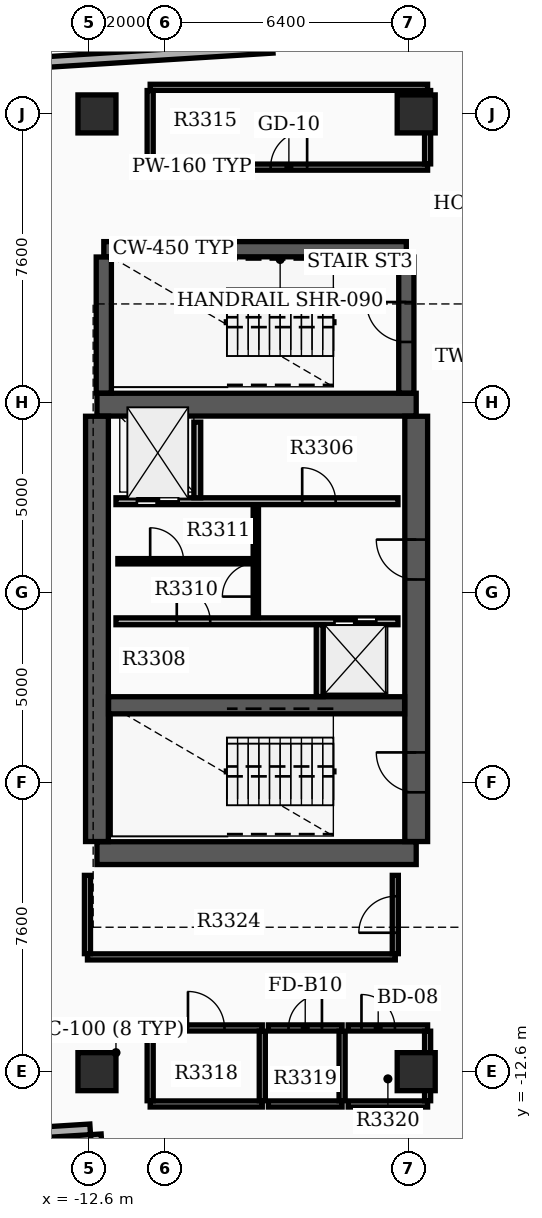
"""IFC4 building model, lengths in metres.
Left out: names, types, materials, properties, quantities, classifications, styles, units other than length and angle.
Written with IfcOpenShell. Run it as: python <this file> out.ifc"""

import sys

from ifc_helpers import new_model, si_unit, direction, frame, frame_2d, origin, origin_2d, place, context, subcontext, project, spatial, rectangle, extrude, element, fill, save


model = new_model("IFC4")
c1 = context("Model", 3, precision=1e-05, world=origin(), true_north=direction((0.0, 1.0)))
c2 = subcontext(c1, "Body", "Model", "MODEL_VIEW")
j1 = project(units=[si_unit("LENGTHUNIT", "METRE"), si_unit("PLANEANGLEUNIT", "RADIAN")], contexts=[c1])
p1 = place(None, origin())
s1 = spatial("IfcSite", under=j1, at=p1, CompositionType="ELEMENT")
p2 = place(p1, origin())
s2 = spatial("IfcBuilding", under=s1, at=p2, CompositionType="ELEMENT")
p3 = place(p2, frame((0.0, 0.0, 209.1)))
s3 = spatial("IfcBuildingStorey", under=s2, at=p3, CompositionType="ELEMENT", Elevation=209.1)
for number, where, z_axis, x_axis in (
    (1, (-12.4, -6.85, 0.0), (0.0, 0.0, 1.0), (1.0, 0.0, 0.0)),
    (2, (-12.4, 4.95, 0.0), (0.0, 0.0, 1.0), (1.0, 0.0, 0.0)),
):
    element("IfcWall", number, at=place(p3, frame(where, z_axis=z_axis, x_axis=x_axis)), inside=s3, PredefinedType="SHEAR", context=c2, shape_type="SweptSolid", body=[
        extrude(rectangle(XDim=8.4, YDim=0.6, at=frame_2d((4.2, 0.0))), origin(), (0.0, 0.0, 1.0), 3.7),
    ])
p4 = place(p3, frame((-12.4, -6.545, 0.0), z_axis=(0.0, 0.0, 1.0), x_axis=(0.0, 1.0, 0.0)))
e3 = element("IfcWall", 3, at=p4, inside=s3, PredefinedType="SHEAR", context=c2, shape_type="SweptSolid", body=[
    extrude(rectangle(XDim=11.19, YDim=0.6, at=frame_2d((5.595, 0.0))), origin(), (0.0, 0.0, 1.0), 3.7),
])
p5 = place(p3, frame((-4.0, -6.545, 0.0), z_axis=(0.0, 0.0, 1.0), x_axis=(0.0, 1.0, 0.0)))
e4 = element("IfcWall", 4, at=p5, inside=s3, PredefinedType="SHEAR", context=c2, shape_type="SweptSolid", body=[
    extrude(rectangle(XDim=11.19, YDim=0.6, at=frame_2d((5.595, 0.0))), origin(), (0.0, 0.0, 1.0), 3.7),
])
p6 = place(p5, frame((1.295, 0.0, 0.0)))
e5 = element("IfcOpeningElement", 5, at=p6, cuts=e4, PredefinedType="OPENING", context=c2, shape_type="SweptSolid", body=[
    extrude(rectangle(XDim=1.05, YDim=2.15, at=frame_2d((0.525, 1.075))), frame((0.0, 0.31, 0.0), z_axis=(0.0, -1.0, 0.0), x_axis=(1.0, 0.0, 0.0)), (0.0, 0.0, 1.0), 0.62),
])
p7 = place(p5, frame((6.895, 0.0, 0.0)))
e6 = element("IfcOpeningElement", 6, at=p7, cuts=e4, PredefinedType="OPENING", context=c2, shape_type="SweptSolid", body=[
    extrude(rectangle(XDim=1.05, YDim=2.15, at=frame_2d((0.525, 1.075))), frame((0.0, 0.31, 0.0), z_axis=(0.0, -1.0, 0.0), x_axis=(1.0, 0.0, 0.0)), (0.0, 0.0, 1.0), 0.62),
])
p8 = place(p3, frame((-12.095, -2.96, 0.0), z_axis=(0.0, 0.0, 1.0), x_axis=(1.0, 0.0, 0.0)))
e7 = element("IfcWall", 7, at=p8, inside=s3, PredefinedType="SHEAR", context=c2, shape_type="SweptSolid", body=[
    extrude(rectangle(XDim=7.79, YDim=0.45, at=frame_2d((3.895, 0.0))), origin(), (0.0, 0.0, 1.0), 3.7),
])
p9 = place(p3, frame((-12.22, 9.04, 0.0), z_axis=(0.0, 0.0, 1.0), x_axis=(1.0, 0.0, 0.0)))
e8 = element("IfcWall", 8, at=p9, inside=s3, PredefinedType="SHEAR", context=c2, shape_type="SweptSolid", body=[
    extrude(rectangle(XDim=7.96, YDim=0.4, at=frame_2d((3.98, 0.0))), origin(), (0.0, 0.0, 1.0), 3.7),
])
p10 = place(p3, frame((-12.22, 5.255, 0.0), z_axis=(0.0, 0.0, 1.0), x_axis=(0.0, 1.0, 0.0)))
e9 = element("IfcWall", 9, at=p10, inside=s3, PredefinedType="SHEAR", context=c2, shape_type="SweptSolid", body=[
    extrude(rectangle(XDim=3.58, YDim=0.4, at=frame_2d((1.79, 0.0))), origin(), (0.0, 0.0, 1.0), 3.7),
])
p11 = place(p3, frame((-4.26, 5.255, 0.0), z_axis=(0.0, 0.0, 1.0), x_axis=(0.0, 1.0, 0.0)))
e10 = element("IfcWall", 10, at=p11, inside=s3, PredefinedType="SHEAR", context=c2, shape_type="SweptSolid", body=[
    extrude(rectangle(XDim=3.58, YDim=0.4, at=frame_2d((1.79, 0.0))), origin(), (0.0, 0.0, 1.0), 3.7),
])
p12 = place(p11, frame((1.345, 0.0, 0.0)))
e11 = element("IfcOpeningElement", 11, at=p12, cuts=e10, PredefinedType="OPENING", context=c2, shape_type="SweptSolid", body=[
    extrude(rectangle(XDim=1.05, YDim=2.15, at=frame_2d((0.525, 1.075))), frame((0.0, 0.21, 0.0), z_axis=(0.0, -1.0, 0.0), x_axis=(1.0, 0.0, 0.0)), (0.0, 0.0, 1.0), 0.42),
])
for number, where, z_axis, x_axis in (
    (12, (-12.4, -12.6, 0.0), (0.0, 0.0, 1.0), (1.0, 0.0, 0.0)),
    (13, (-12.4, 12.6, 0.0), (0.0, 0.0, 1.0), (1.0, 0.0, 0.0)),
    (14, (-4.0, -12.6, 0.0), (0.0, 0.0, 1.0), (1.0, 0.0, 0.0)),
    (15, (-4.0, 12.6, 0.0), (0.0, 0.0, 1.0), (1.0, 0.0, 0.0)),
):
    element("IfcColumn", number, at=place(p3, frame(where, z_axis=z_axis, x_axis=x_axis)), inside=s3, PredefinedType="COLUMN", context=c2, shape_type="SweptSolid", body=[
        extrude(rectangle(XDim=1.0, YDim=1.0, at=origin_2d()), origin(), (0.0, 0.0, 1.0), 3.9),
    ])
p13 = place(p3, frame((-14.063, 13.945, 0.0), z_axis=(0.0, 0.0, 1.0), x_axis=(0.998027314704, 0.062781200242, 0.0)))
e16 = element("IfcWall", 16, at=p13, inside=s3, PredefinedType="STANDARD", context=c2, shape_type="SweptSolid", body=[
    extrude(rectangle(XDim=6.3, YDim=0.28, at=frame_2d((3.15, 0.0))), origin(), (0.0, 0.0, 1.0), 3.18),
])
p14 = place(p3, frame((-13.796, -14.194, 0.0), z_axis=(0.0, 0.0, 1.0), x_axis=(0.998023660242, 0.06283926796, 0.0)))
e17 = element("IfcWall", 17, at=p14, inside=s3, PredefinedType="STANDARD", context=c2, shape_type="SweptSolid", body=[
    extrude(rectangle(XDim=1.22, YDim=0.28, at=frame_2d((0.61, 0.0))), origin(), (0.0, 0.0, 1.0), 3.18),
])
p15 = place(p3, frame((-12.43, -14.249, 0.0), z_axis=(0.0, 0.0, 1.0), x_axis=(0.062824119533, -0.998024613927, 0.0)))
e18 = element("IfcWall", 18, at=p15, inside=s3, PredefinedType="STANDARD", context=c2, shape_type="SweptSolid", body=[
    extrude(rectangle(XDim=1.5, YDim=0.28, at=frame_2d((0.75, 0.0))), origin(), (0.0, 0.0, 1.0), 3.18),
])
p16 = place(p3, frame((-11.9, 2.41, 0.0), z_axis=(0.0, 0.0, 1.0), x_axis=(1.0, 0.0, 0.0)))
e19 = element("IfcWall", 19, at=p16, inside=s3, PredefinedType="SOLIDWALL", context=c2, shape_type="SweptSolid", body=[
    extrude(rectangle(XDim=7.42, YDim=0.18, at=frame_2d((3.71, 0.0))), origin(), (0.0, 0.0, 1.0), 3.17),
])
p17 = place(p16, frame((0.55, 0.0, 0.0)))
e20 = element("IfcOpeningElement", 20, at=p17, cuts=e19, PredefinedType="OPENING", context=c2, shape_type="SweptSolid", body=[
    extrude(rectangle(XDim=1.1, YDim=2.15, at=frame_2d((0.55, 1.075))), frame((0.0, 0.1, 0.0), z_axis=(0.0, -1.0, 0.0), x_axis=(1.0, 0.0, 0.0)), (0.0, 0.0, 1.0), 0.2),
])
p18 = place(p16, frame((4.9, 0.0, 0.0)))
e21 = element("IfcOpeningElement", 21, at=p18, cuts=e19, PredefinedType="OPENING", context=c2, shape_type="SweptSolid", body=[
    extrude(rectangle(XDim=0.88, YDim=2.1, at=frame_2d((0.44, 1.05))), frame((0.0, 0.1, 0.0), z_axis=(0.0, -1.0, 0.0), x_axis=(1.0, 0.0, 0.0)), (0.0, 0.0, 1.0), 0.2),
])
p19 = place(p3, frame((-11.9, -0.75, 0.0), z_axis=(0.0, 0.0, 1.0), x_axis=(1.0, 0.0, 0.0)))
e22 = element("IfcWall", 22, at=p19, inside=s3, PredefinedType="SOLIDWALL", context=c2, shape_type="SweptSolid", body=[
    extrude(rectangle(XDim=7.42, YDim=0.18, at=frame_2d((3.71, 0.0))), origin(), (0.0, 0.0, 1.0), 3.17),
])
p20 = place(p19, frame((5.75, 0.0, 0.0)))
e23 = element("IfcOpeningElement", 23, at=p20, cuts=e22, PredefinedType="OPENING", context=c2, shape_type="SweptSolid", body=[
    extrude(rectangle(XDim=1.1, YDim=2.15, at=frame_2d((0.55, 1.075))), frame((0.0, 0.1, 0.0), z_axis=(0.0, -1.0, 0.0), x_axis=(1.0, 0.0, 0.0)), (0.0, 0.0, 1.0), 0.2),
])
p21 = place(p19, frame((1.6, 0.0, 0.0)))
e24 = element("IfcOpeningElement", 24, at=p21, cuts=e22, PredefinedType="OPENING", context=c2, shape_type="SweptSolid", body=[
    extrude(rectangle(XDim=0.88, YDim=2.1, at=frame_2d((0.44, 1.05))), frame((0.0, 0.1, 0.0), z_axis=(0.0, -1.0, 0.0), x_axis=(1.0, 0.0, 0.0)), (0.0, 0.0, 1.0), 0.2),
])
p22 = place(p3, frame((-9.76, 2.5, 0.0), z_axis=(0.0, 0.0, 1.0), x_axis=(0.0, 1.0, 0.0)))
e25 = element("IfcWall", 25, at=p22, inside=s3, PredefinedType="SOLIDWALL", context=c2, shape_type="SweptSolid", body=[
    extrude(rectangle(XDim=1.99, YDim=0.18, at=frame_2d((0.995, 0.0))), origin(), (0.0, 0.0, 1.0), 3.17),
])
p23 = place(p3, frame((-6.54, -2.73, 0.0), z_axis=(0.0, 0.0, 1.0), x_axis=(0.0, 1.0, 0.0)))
e26 = element("IfcWall", 26, at=p23, inside=s3, PredefinedType="SOLIDWALL", context=c2, shape_type="SweptSolid", body=[
    extrude(rectangle(XDim=1.89, YDim=0.18, at=frame_2d((0.945, 0.0))), origin(), (0.0, 0.0, 1.0), 3.17),
])
p24 = place(p3, frame((-8.22, -0.65, 0.0), z_axis=(0.0, 0.0, 1.0), x_axis=(0.0, 1.0, 0.0)))
e27 = element("IfcWall", 27, at=p24, inside=s3, PredefinedType="SOLIDWALL", context=c2, shape_type="SweptSolid", body=[
    extrude(rectangle(XDim=2.96, YDim=0.14, at=frame_2d((1.48, 0.0))), origin(), (0.0, 0.0, 1.0), 3.17),
])
p25 = place(p24, frame((0.55, 0.0, 0.0)))
e28 = element("IfcOpeningElement", 28, at=p25, cuts=e27, PredefinedType="OPENING", context=c2, shape_type="SweptSolid", body=[
    extrude(rectangle(XDim=0.88, YDim=2.1, at=frame_2d((0.44, 1.05))), frame((0.0, 0.08, 0.0), z_axis=(0.0, -1.0, 0.0), x_axis=(1.0, 0.0, 0.0)), (0.0, 0.0, 1.0), 0.16),
])
p26 = place(p3, frame((-11.85, 0.83, 0.0), z_axis=(0.0, 0.0, 1.0), x_axis=(1.0, 0.0, 0.0)))
e29 = element("IfcWall", 29, at=p26, inside=s3, PredefinedType="PARTITIONING", context=c2, shape_type="SweptSolid", body=[
    extrude(rectangle(XDim=3.552, YDim=0.14, at=frame_2d((1.776, 0.0))), origin(), (0.0, 0.0, 1.0), 3.17),
])
p27 = place(p26, frame((0.85, 0.0, 0.0)))
e30 = element("IfcOpeningElement", 30, at=p27, cuts=e29, PredefinedType="OPENING", context=c2, shape_type="SweptSolid", body=[
    extrude(rectangle(XDim=0.88, YDim=2.1, at=frame_2d((0.44, 1.05))), frame((0.0, 0.08, 0.0), z_axis=(0.0, -1.0, 0.0), x_axis=(1.0, 0.0, 0.0)), (0.0, 0.0, 1.0), 0.16),
])
p28 = place(p3, frame((-11.0, 11.2, 0.0), z_axis=(0.0, 0.0, 1.0), x_axis=(1.0, 0.0, 0.0)))
e31 = element("IfcWall", 31, at=p28, inside=s3, PredefinedType="PARTITIONING", context=c2, shape_type="SweptSolid", body=[
    extrude(rectangle(XDim=7.3, YDim=0.16, at=frame_2d((3.65, 0.0))), origin(), (0.0, 0.0, 1.0), 3.17),
])
p29 = place(p28, frame((3.17, 0.0, 0.0)))
e32 = element("IfcOpeningElement", 32, at=p29, cuts=e31, PredefinedType="OPENING", context=c2, shape_type="SweptSolid", body=[
    extrude(rectangle(XDim=0.96, YDim=2.15, at=frame_2d((0.48, 1.075))), frame((0.0, 0.09, 0.0), z_axis=(0.0, -1.0, 0.0), x_axis=(1.0, 0.0, 0.0)), (0.0, 0.0, 1.0), 0.18),
])
p30 = place(p3, frame((-11.0, 13.3, 0.0), z_axis=(0.0, 0.0, 1.0), x_axis=(1.0, 0.0, 0.0)))
e33 = element("IfcWall", 33, at=p30, inside=s3, PredefinedType="PARTITIONING", context=c2, shape_type="SweptSolid", body=[
    extrude(rectangle(XDim=7.3, YDim=0.16, at=frame_2d((3.65, 0.0))), origin(), (0.0, 0.0, 1.0), 3.17),
])
for number, where, z_axis, x_axis in (
    (34, (-11.0, 11.285, 0.0), (0.0, 0.0, 1.0), (0.0, 1.0, 0.0)),
    (35, (-3.7, 11.285, 0.0), (0.0, 0.0, 1.0), (0.0, 1.0, 0.0)),
):
    element("IfcWall", number, at=place(p3, frame(where, z_axis=z_axis, x_axis=x_axis)), inside=s3, PredefinedType="PARTITIONING", context=c2, shape_type="SweptSolid", body=[
        extrude(rectangle(XDim=1.93, YDim=0.16, at=frame_2d((0.965, 0.0))), origin(), (0.0, 0.0, 1.0), 3.17),
    ])
p31 = place(p3, frame((-11.0, -13.45, 0.0), z_axis=(0.0, 0.0, 1.0), x_axis=(1.0, 0.0, 0.0)))
e36 = element("IfcWall", 36, at=p31, inside=s3, PredefinedType="PARTITIONING", context=c2, shape_type="SweptSolid", body=[
    extrude(rectangle(XDim=2.95, YDim=0.16, at=frame_2d((1.475, 0.0))), origin(), (0.0, 0.0, 1.0), 3.17),
])
p32 = place(p3, frame((-11.0, -11.45, 0.0), z_axis=(0.0, 0.0, 1.0), x_axis=(1.0, 0.0, 0.0)))
e37 = element("IfcWall", 37, at=p32, inside=s3, PredefinedType="PARTITIONING", context=c2, shape_type="SweptSolid", body=[
    extrude(rectangle(XDim=2.95, YDim=0.16, at=frame_2d((1.475, 0.0))), origin(), (0.0, 0.0, 1.0), 3.17),
])
p33 = place(p32, frame((0.995, 0.0, 0.0)))
e38 = element("IfcOpeningElement", 38, at=p33, cuts=e37, PredefinedType="OPENING", context=c2, shape_type="SweptSolid", body=[
    extrude(rectangle(XDim=0.96, YDim=2.15, at=frame_2d((0.48, 1.075))), frame((0.0, 0.09, 0.0), z_axis=(0.0, -1.0, 0.0), x_axis=(1.0, 0.0, 0.0)), (0.0, 0.0, 1.0), 0.18),
])
for number, where, z_axis, x_axis in (
    (39, (-11.0, -13.365, 0.0), (0.0, 0.0, 1.0), (0.0, 1.0, 0.0)),
    (40, (-8.05, -13.365, 0.0), (0.0, 0.0, 1.0), (0.0, 1.0, 0.0)),
):
    element("IfcWall", number, at=place(p3, frame(where, z_axis=z_axis, x_axis=x_axis)), inside=s3, PredefinedType="PARTITIONING", context=c2, shape_type="SweptSolid", body=[
        extrude(rectangle(XDim=1.83, YDim=0.16, at=frame_2d((0.915, 0.0))), origin(), (0.0, 0.0, 1.0), 3.17),
    ])
p34 = place(p3, frame((-7.89, -13.45, 0.0), z_axis=(0.0, 0.0, 1.0), x_axis=(1.0, 0.0, 0.0)))
e41 = element("IfcWall", 41, at=p34, inside=s3, PredefinedType="PARTITIONING", context=c2, shape_type="SweptSolid", body=[
    extrude(rectangle(XDim=1.94, YDim=0.16, at=frame_2d((0.97, 0.0))), origin(), (0.0, 0.0, 1.0), 3.17),
])
p35 = place(p3, frame((-7.89, -11.45, 0.0), z_axis=(0.0, 0.0, 1.0), x_axis=(1.0, 0.0, 0.0)))
e42 = element("IfcWall", 42, at=p35, inside=s3, PredefinedType="PARTITIONING", context=c2, shape_type="SweptSolid", body=[
    extrude(rectangle(XDim=1.94, YDim=0.16, at=frame_2d((0.97, 0.0))), origin(), (0.0, 0.0, 1.0), 3.17),
])
p36 = place(p35, frame((0.53, 0.0, 0.0)))
e43 = element("IfcOpeningElement", 43, at=p36, cuts=e42, PredefinedType="OPENING", context=c2, shape_type="SweptSolid", body=[
    extrude(rectangle(XDim=0.88, YDim=2.1, at=frame_2d((0.44, 1.05))), frame((0.0, 0.09, 0.0), z_axis=(0.0, -1.0, 0.0), x_axis=(1.0, 0.0, 0.0)), (0.0, 0.0, 1.0), 0.18),
])
p37 = place(p3, frame((-5.95, -13.365, 0.0), z_axis=(0.0, 0.0, 1.0), x_axis=(0.0, 1.0, 0.0)))
e44 = element("IfcWall", 44, at=p37, inside=s3, PredefinedType="PARTITIONING", context=c2, shape_type="SweptSolid", body=[
    extrude(rectangle(XDim=1.83, YDim=0.16, at=frame_2d((0.915, 0.0))), origin(), (0.0, 0.0, 1.0), 3.17),
])
p38 = place(p3, frame((-5.79, -13.45, 0.0), z_axis=(0.0, 0.0, 1.0), x_axis=(1.0, 0.0, 0.0)))
e45 = element("IfcWall", 45, at=p38, inside=s3, PredefinedType="PARTITIONING", context=c2, shape_type="SweptSolid", body=[
    extrude(rectangle(XDim=2.09, YDim=0.16, at=frame_2d((1.045, 0.0))), origin(), (0.0, 0.0, 1.0), 3.17),
])
p39 = place(p3, frame((-5.79, -11.45, 0.0), z_axis=(0.0, 0.0, 1.0), x_axis=(1.0, 0.0, 0.0)))
e46 = element("IfcWall", 46, at=p39, inside=s3, PredefinedType="PARTITIONING", context=c2, shape_type="SweptSolid", body=[
    extrude(rectangle(XDim=2.09, YDim=0.16, at=frame_2d((1.045, 0.0))), origin(), (0.0, 0.0, 1.0), 3.17),
])
p40 = place(p39, frame((0.35, 0.0, 0.0)))
e47 = element("IfcOpeningElement", 47, at=p40, cuts=e46, PredefinedType="OPENING", context=c2, shape_type="SweptSolid", body=[
    extrude(rectangle(XDim=0.88, YDim=2.15, at=frame_2d((0.44, 1.075))), frame((0.0, 0.09, 0.0), z_axis=(0.0, -1.0, 0.0), x_axis=(1.0, 0.0, 0.0)), (0.0, 0.0, 1.0), 0.18),
])
p41 = place(p3, frame((-3.7, -13.365, 0.0), z_axis=(0.0, 0.0, 1.0), x_axis=(0.0, 1.0, 0.0)))
e48 = element("IfcWall", 48, at=p41, inside=s3, PredefinedType="PARTITIONING", context=c2, shape_type="SweptSolid", body=[
    extrude(rectangle(XDim=1.83, YDim=0.16, at=frame_2d((0.915, 0.0))), origin(), (0.0, 0.0, 1.0), 3.17),
])
p42 = place(p3, frame((-12.65, -9.58, 0.0), z_axis=(0.0, 0.0, 1.0), x_axis=(1.0, 0.0, 0.0)))
e49 = element("IfcWall", 49, at=p42, inside=s3, PredefinedType="PARTITIONING", context=c2, shape_type="SweptSolid", body=[
    extrude(rectangle(XDim=8.1, YDim=0.16, at=frame_2d((4.05, 0.0))), origin(), (0.0, 0.0, 1.0), 3.17),
])
p43 = place(p3, frame((-12.65, -9.495, 0.0), z_axis=(0.0, 0.0, 1.0), x_axis=(0.0, 1.0, 0.0)))
e50 = element("IfcWall", 50, at=p43, inside=s3, PredefinedType="PARTITIONING", context=c2, shape_type="SweptSolid", body=[
    extrude(rectangle(XDim=2.06, YDim=0.16, at=frame_2d((1.03, 0.0))), origin(), (0.0, 0.0, 1.0), 3.17),
])
p44 = place(p3, frame((-4.55, -9.495, 0.0), z_axis=(0.0, 0.0, 1.0), x_axis=(0.0, 1.0, 0.0)))
e51 = element("IfcWall", 51, at=p44, inside=s3, PredefinedType="PARTITIONING", context=c2, shape_type="SweptSolid", body=[
    extrude(rectangle(XDim=2.06, YDim=0.16, at=frame_2d((1.03, 0.0))), origin(), (0.0, 0.0, 1.0), 3.17),
])
p45 = place(p44, frame((0.55, 0.0, 0.0)))
e52 = element("IfcOpeningElement", 52, at=p45, cuts=e51, PredefinedType="OPENING", context=c2, shape_type="SweptSolid", body=[
    extrude(rectangle(XDim=0.96, YDim=2.15, at=frame_2d((0.48, 1.075))), frame((0.0, 0.09, 0.0), z_axis=(0.0, -1.0, 0.0), x_axis=(1.0, 0.0, 0.0)), (0.0, 0.0, 1.0), 0.18),
])
p46 = place(p6, origin())
e53 = element("IfcDoor", 53, at=p46, inside=s3, OperationType="SINGLE_SWING_RIGHT", PredefinedType="DOOR", context=c2, shape_type="SweptSolid", body=[
    extrude(rectangle(XDim=1.05, YDim=2.15, at=frame_2d((0.525, 1.075))), frame((0.0, 0.025, 0.0), z_axis=(0.0, -1.0, 0.0), x_axis=(1.0, 0.0, 0.0)), (0.0, 0.0, 1.0), 0.05),
])
fill(e5, e53)
p47 = place(p7, origin())
e54 = element("IfcDoor", 54, at=p47, inside=s3, OperationType="SINGLE_SWING_RIGHT", PredefinedType="DOOR", context=c2, shape_type="SweptSolid", body=[
    extrude(rectangle(XDim=1.05, YDim=2.15, at=frame_2d((0.525, 1.075))), frame((0.0, 0.025, 0.0), z_axis=(0.0, -1.0, 0.0), x_axis=(1.0, 0.0, 0.0)), (0.0, 0.0, 1.0), 0.05),
])
fill(e6, e54)
p48 = place(p12, origin())
e55 = element("IfcDoor", 55, at=p48, inside=s3, OperationType="SINGLE_SWING_RIGHT", PredefinedType="DOOR", context=c2, shape_type="SweptSolid", body=[
    extrude(rectangle(XDim=1.05, YDim=2.15, at=frame_2d((0.525, 1.075))), frame((0.0, 0.025, 0.0), z_axis=(0.0, -1.0, 0.0), x_axis=(1.0, 0.0, 0.0)), (0.0, 0.0, 1.0), 0.05),
])
fill(e11, e55)
p49 = place(p17, origin())
e56 = element("IfcDoor", 56, at=p49, inside=s3, OperationType="DOUBLE_DOOR_SLIDING", PredefinedType="DOOR", context=c2, shape_type="SweptSolid", body=[
    extrude(rectangle(XDim=1.1, YDim=2.15, at=frame_2d((0.55, 1.075))), frame((0.0, 0.025, 0.0), z_axis=(0.0, -1.0, 0.0), x_axis=(1.0, 0.0, 0.0)), (0.0, 0.0, 1.0), 0.05),
])
fill(e20, e56)
p50 = place(p20, origin())
e57 = element("IfcDoor", 57, at=p50, inside=s3, OperationType="DOUBLE_DOOR_SLIDING", PredefinedType="DOOR", context=c2, shape_type="SweptSolid", body=[
    extrude(rectangle(XDim=1.1, YDim=2.15, at=frame_2d((0.55, 1.075))), frame((0.0, 0.025, 0.0), z_axis=(0.0, -1.0, 0.0), x_axis=(1.0, 0.0, 0.0)), (0.0, 0.0, 1.0), 0.05),
])
fill(e23, e57)
p51 = place(p18, origin())
e58 = element("IfcDoor", 58, at=p51, inside=s3, OperationType="SINGLE_SWING_LEFT", PredefinedType="DOOR", context=c2, shape_type="SweptSolid", body=[
    extrude(rectangle(XDim=0.88, YDim=2.1, at=frame_2d((0.44, 1.05))), frame((0.0, 0.025, 0.0), z_axis=(0.0, -1.0, 0.0), x_axis=(1.0, 0.0, 0.0)), (0.0, 0.0, 1.0), 0.05),
])
fill(e21, e58)
p52 = place(p21, origin())
e59 = element("IfcDoor", 59, at=p52, inside=s3, OperationType="SINGLE_SWING_LEFT", PredefinedType="DOOR", context=c2, shape_type="SweptSolid", body=[
    extrude(rectangle(XDim=0.88, YDim=2.1, at=frame_2d((0.44, 1.05))), frame((0.0, 0.025, 0.0), z_axis=(0.0, -1.0, 0.0), x_axis=(1.0, 0.0, 0.0)), (0.0, 0.0, 1.0), 0.05),
])
fill(e24, e59)
p53 = place(p25, origin())
e60 = element("IfcDoor", 60, at=p53, inside=s3, OperationType="SINGLE_SWING_LEFT", PredefinedType="DOOR", context=c2, shape_type="SweptSolid", body=[
    extrude(rectangle(XDim=0.88, YDim=2.1, at=frame_2d((0.44, 1.05))), frame((0.0, 0.025, 0.0), z_axis=(0.0, -1.0, 0.0), x_axis=(1.0, 0.0, 0.0)), (0.0, 0.0, 1.0), 0.05),
])
fill(e28, e60)
p54 = place(p27, origin())
e61 = element("IfcDoor", 61, at=p54, inside=s3, OperationType="SINGLE_SWING_LEFT", PredefinedType="DOOR", context=c2, shape_type="SweptSolid", body=[
    extrude(rectangle(XDim=0.88, YDim=2.1, at=frame_2d((0.44, 1.05))), frame((0.0, 0.025, 0.0), z_axis=(0.0, -1.0, 0.0), x_axis=(1.0, 0.0, 0.0)), (0.0, 0.0, 1.0), 0.05),
])
fill(e30, e61)
p55 = place(p29, origin())
e62 = element("IfcDoor", 62, at=p55, inside=s3, OperationType="SINGLE_SWING_RIGHT", PredefinedType="DOOR", context=c2, shape_type="SweptSolid", body=[
    extrude(rectangle(XDim=0.96, YDim=2.15, at=frame_2d((0.48, 1.075))), frame((0.0, 0.025, 0.0), z_axis=(0.0, -1.0, 0.0), x_axis=(1.0, 0.0, 0.0)), (0.0, 0.0, 1.0), 0.05),
])
fill(e32, e62)
p56 = place(p33, origin())
e63 = element("IfcDoor", 63, at=p56, inside=s3, OperationType="SINGLE_SWING_LEFT", PredefinedType="DOOR", context=c2, shape_type="SweptSolid", body=[
    extrude(rectangle(XDim=0.96, YDim=2.15, at=frame_2d((0.48, 1.075))), frame((0.0, 0.025, 0.0), z_axis=(0.0, -1.0, 0.0), x_axis=(1.0, 0.0, 0.0)), (0.0, 0.0, 1.0), 0.05),
])
fill(e38, e63)
p57 = place(p36, origin())
e64 = element("IfcDoor", 64, at=p57, inside=s3, OperationType="SINGLE_SWING_RIGHT", PredefinedType="DOOR", context=c2, shape_type="SweptSolid", body=[
    extrude(rectangle(XDim=0.88, YDim=2.1, at=frame_2d((0.44, 1.05))), frame((0.0, 0.025, 0.0), z_axis=(0.0, -1.0, 0.0), x_axis=(1.0, 0.0, 0.0)), (0.0, 0.0, 1.0), 0.05),
])
fill(e43, e64)
p58 = place(p40, origin())
e65 = element("IfcDoor", 65, at=p58, inside=s3, OperationType="SINGLE_SWING_LEFT", PredefinedType="DOOR", context=c2, shape_type="SweptSolid", body=[
    extrude(rectangle(XDim=0.88, YDim=2.15, at=frame_2d((0.44, 1.075))), frame((0.0, 0.025, 0.0), z_axis=(0.0, -1.0, 0.0), x_axis=(1.0, 0.0, 0.0)), (0.0, 0.0, 1.0), 0.05),
])
fill(e47, e65)
p59 = place(p45, origin())
e66 = element("IfcDoor", 66, at=p59, inside=s3, OperationType="SINGLE_SWING_LEFT", PredefinedType="DOOR", context=c2, shape_type="SweptSolid", body=[
    extrude(rectangle(XDim=0.96, YDim=2.15, at=frame_2d((0.48, 1.075))), frame((0.0, 0.025, 0.0), z_axis=(0.0, -1.0, 0.0), x_axis=(1.0, 0.0, 0.0)), (0.0, 0.0, 1.0), 0.05),
])
fill(e52, e66)
save(model, sys.argv[1])
